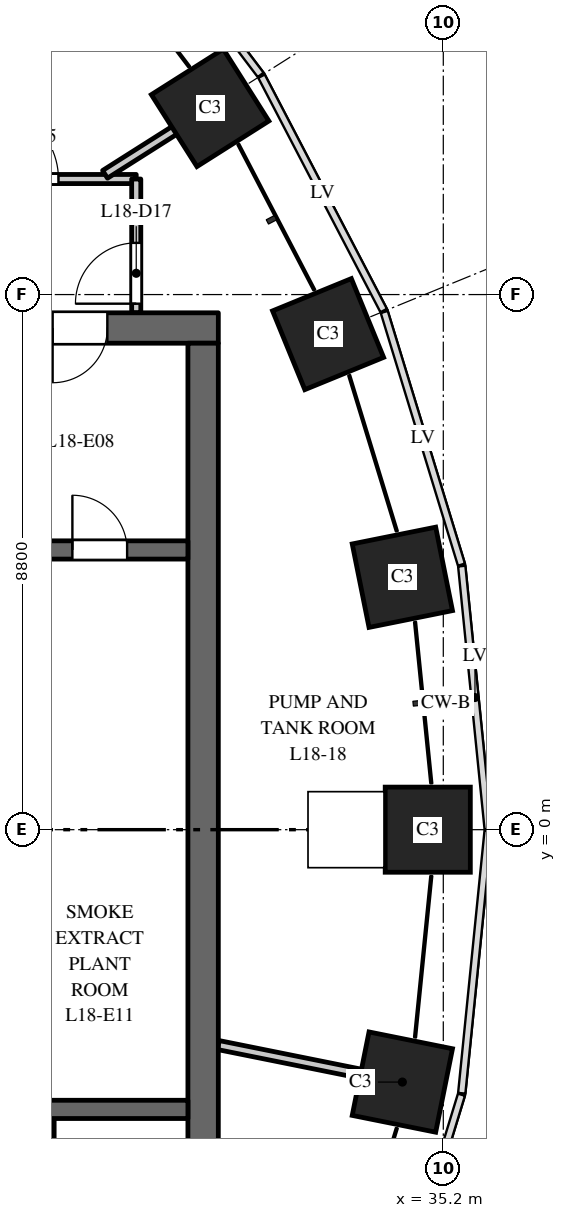
"""IFC4 building model, lengths in metres.
Left out: names, types, materials, properties, quantities, classifications, styles, units other than length and angle.
Written with IfcOpenShell. Run it as: python <this file> out.ifc"""

import sys

from ifc_helpers import new_model, si_unit, direction, frame, frame_2d, origin, origin_2d, place, context, subcontext, project, spatial, rectangle, extrude, element, fill, save


model = new_model("IFC4")
c1 = context("Model", 3, precision=1e-05, world=origin(), true_north=direction((0.0, 1.0)))
c2 = subcontext(c1, "Body", "Model", "MODEL_VIEW")
j1 = project(units=[si_unit("LENGTHUNIT", "METRE"), si_unit("PLANEANGLEUNIT", "RADIAN")], contexts=[c1])
p1 = place(None, origin())
s1 = spatial("IfcSite", under=j1, at=p1, CompositionType="ELEMENT")
p2 = place(p1, origin())
s2 = spatial("IfcBuilding", under=s1, at=p2, CompositionType="ELEMENT")
p3 = place(p2, frame((0.0, 0.0, 82.5)))
s3 = spatial("IfcBuildingStorey", under=s2, at=p3, CompositionType="ELEMENT", Elevation=82.5)
for number, where, z_axis, x_axis in (
    (1, (34.945, 0.0, 0.0), (0.0, 0.0, 1.0), (0.0, 1.0, 0.0)),
    (2, (34.527, 4.151, 0.0), (0.0, 0.0, 1.0), (-0.197, 0.98, 0.0)),
    (3, (33.305, 8.149, 0.0), (0.0, 0.0, 1.0), (-0.379, 0.925, 0.0)),
    (4, (31.365, 11.871, 0.0), (0.0, 0.0, 1.0), (-0.535, 0.845, 0.0)),
    (5, (34.527, -4.151, 0.0), (0.0, 0.0, 1.0), (0.197, 0.98, 0.0)),
):
    element("IfcColumn", number, at=place(p3, frame(where, z_axis=z_axis, x_axis=x_axis)), inside=s3, PredefinedType="COLUMN", context=c2, shape_type="SweptSolid", body=[
        extrude(rectangle(XDim=1.4, YDim=1.4, at=origin_2d()), origin(), (0.0, 0.0, 1.0), 5.5),
    ])
p4 = place(p3, frame((16.5, 8.25, 0.0), z_axis=(0.0, 0.0, 1.0), x_axis=(1.0, 0.0, 0.0)))
e6 = element("IfcWall", 6, at=p4, inside=s3, PredefinedType="SHEAR", context=c2, shape_type="SweptSolid", body=[
    extrude(rectangle(XDim=15.0, YDim=0.5, at=frame_2d((7.5, 0.0))), origin(), (0.0, 0.0, 1.0), 5.2),
])
p5 = place(p4, frame((6.9, 0.0, 0.0)))
e7 = element("IfcOpeningElement", 7, at=p5, cuts=e6, PredefinedType="OPENING", context=c2, shape_type="SweptSolid", body=[
    extrude(rectangle(XDim=1.2, YDim=2.1, at=frame_2d((0.6, 1.05))), frame((0.0, 0.26, 0.0), z_axis=(0.0, -1.0, 0.0), x_axis=(1.0, 0.0, 0.0)), (0.0, 0.0, 1.0), 0.52),
])
p6 = place(p4, frame((12.275, 0.0, 0.0)))
e8 = element("IfcOpeningElement", 8, at=p6, cuts=e6, PredefinedType="OPENING", context=c2, shape_type="SweptSolid", body=[
    extrude(rectangle(XDim=0.9, YDim=2.1, at=frame_2d((0.45, 1.05))), frame((0.0, 0.26, 0.0), z_axis=(0.0, -1.0, 0.0), x_axis=(1.0, 0.0, 0.0)), (0.0, 0.0, 1.0), 0.52),
])
p7 = place(p3, frame((31.25, -8.0, 0.0), z_axis=(0.0, 0.0, 1.0), x_axis=(0.0, 1.0, 0.0)))
e9 = element("IfcWall", 9, at=p7, inside=s3, PredefinedType="SHEAR", context=c2, shape_type="SweptSolid", body=[
    extrude(rectangle(XDim=16.0, YDim=0.5, at=frame_2d((8.0, 0.0))), origin(), (0.0, 0.0, 1.0), 5.2),
])
p8 = place(p3, frame((24.9, 4.6, 0.0), z_axis=(0.0, 0.0, 1.0), x_axis=(1.0, 0.0, 0.0)))
e10 = element("IfcWall", 10, at=p8, inside=s3, PredefinedType="SHEAR", context=c2, shape_type="SweptSolid", body=[
    extrude(rectangle(XDim=6.1, YDim=0.3, at=frame_2d((3.05, 0.0))), origin(), (0.0, 0.0, 1.0), 5.2),
])
p9 = place(p8, frame((4.2, 0.0, 0.0)))
e11 = element("IfcOpeningElement", 11, at=p9, cuts=e10, PredefinedType="OPENING", context=c2, shape_type="SweptSolid", body=[
    extrude(rectangle(XDim=0.9, YDim=2.1, at=frame_2d((0.45, 1.05))), frame((0.0, 0.16, 0.0), z_axis=(0.0, -1.0, 0.0), x_axis=(1.0, 0.0, 0.0)), (0.0, 0.0, 1.0), 0.32),
])
p10 = place(p3, frame((28.7, -8.0, 0.0), z_axis=(0.0, 0.0, 1.0), x_axis=(0.0, 1.0, 0.0)))
e12 = element("IfcWall", 12, at=p10, inside=s3, PredefinedType="PARTITIONING", context=c2, shape_type="SweptSolid", body=[
    extrude(rectangle(XDim=3.25, YDim=0.2, at=frame_2d((1.625, 0.0))), origin(), (0.0, 0.0, 1.0), 5.2),
])
p11 = place(p3, frame((24.9, -4.6, 0.0), z_axis=(0.0, 0.0, 1.0), x_axis=(1.0, 0.0, 0.0)))
e13 = element("IfcWall", 13, at=p11, inside=s3, PredefinedType="SHEAR", context=c2, shape_type="SweptSolid", body=[
    extrude(rectangle(XDim=6.1, YDim=0.3, at=frame_2d((3.05, 0.0))), origin(), (0.0, 0.0, 1.0), 5.2),
])
p12 = place(p3, frame((16.5, 10.7, 0.0), z_axis=(0.0, 0.0, 1.0), x_axis=(1.0, 0.0, 0.0)))
e14 = element("IfcWall", 14, at=p12, inside=s3, PredefinedType="PARTITIONING", context=c2, shape_type="SweptSolid", body=[
    extrude(rectangle(XDim=13.65, YDim=0.15, at=frame_2d((6.825, 0.0))), origin(), (0.0, 0.0, 1.0), 4.25),
])
p13 = place(p12, frame((11.171, 0.0, 0.0)))
e15 = element("IfcOpeningElement", 15, at=p13, cuts=e14, PredefinedType="OPENING", context=c2, shape_type="SweptSolid", body=[
    extrude(rectangle(XDim=1.2, YDim=2.1, at=frame_2d((0.6, 1.05))), frame((0.0, 0.085, 0.0), z_axis=(0.0, -1.0, 0.0), x_axis=(1.0, 0.0, 0.0)), (0.0, 0.0, 1.0), 0.17),
])
p14 = place(p3, frame((29.637, 10.777, 0.0), z_axis=(0.0, 0.0, 1.0), x_axis=(0.844747041197, 0.535165802709, 0.0)))
e16 = element("IfcWall", 16, at=p14, inside=s3, PredefinedType="PARTITIONING", context=c2, shape_type="SweptSolid", body=[
    extrude(rectangle(XDim=2.145, YDim=0.15, at=frame_2d((1.073, 0.0))), origin(), (0.0, 0.0, 1.0), 5.2),
])
p15 = place(p3, frame((31.5, -3.542, 0.0), z_axis=(0.0, 0.0, 1.0), x_axis=(0.98034430806, -0.197294291997, 0.0)))
e17 = element("IfcWall", 17, at=p15, inside=s3, PredefinedType="PARTITIONING", context=c2, shape_type="SweptSolid", body=[
    extrude(rectangle(XDim=3.188, YDim=0.15, at=frame_2d((1.594, 0.0))), origin(), (0.0, 0.0, 1.0), 5.2),
])
p16 = place(p3, frame((30.15, 8.5, 0.0), z_axis=(0.0, 0.0, 1.0), x_axis=(0.0, 1.0, 0.0)))
e18 = element("IfcWall", 18, at=p16, inside=s3, PredefinedType="PARTITIONING", context=c2, shape_type="SweptSolid", body=[
    extrude(rectangle(XDim=2.2, YDim=0.15, at=frame_2d((1.1, 0.0))), origin(), (0.0, 0.0, 1.0), 5.2),
])
p17 = place(p16, frame((0.15, 0.0, 0.0)))
e19 = element("IfcOpeningElement", 19, at=p17, cuts=e18, PredefinedType="OPENING", context=c2, shape_type="SweptSolid", body=[
    extrude(rectangle(XDim=1.0, YDim=2.1, at=frame_2d((0.5, 1.05))), frame((0.0, 0.085, 0.0), z_axis=(0.0, -1.0, 0.0), x_axis=(1.0, 0.0, 0.0)), (0.0, 0.0, 1.0), 0.17),
])
p18 = place(p6, origin())
e20 = element("IfcDoor", 20, at=p18, inside=s3, OperationType="SINGLE_SWING_LEFT", PredefinedType="DOOR", context=c2, shape_type="SweptSolid", body=[
    extrude(rectangle(XDim=0.9, YDim=2.1, at=frame_2d((0.45, 1.05))), frame((0.0, 0.025, 0.0), z_axis=(0.0, -1.0, 0.0), x_axis=(1.0, 0.0, 0.0)), (0.0, 0.0, 1.0), 0.05),
])
fill(e8, e20)
p19 = place(p9, origin())
e21 = element("IfcDoor", 21, at=p19, inside=s3, OperationType="SINGLE_SWING_RIGHT", PredefinedType="DOOR", context=c2, shape_type="SweptSolid", body=[
    extrude(rectangle(XDim=0.9, YDim=2.1, at=frame_2d((0.45, 1.05))), frame((0.0, 0.025, 0.0), z_axis=(0.0, -1.0, 0.0), x_axis=(1.0, 0.0, 0.0)), (0.0, 0.0, 1.0), 0.05),
])
fill(e11, e21)
p20 = place(p13, origin())
e22 = element("IfcDoor", 22, at=p20, inside=s3, OperationType="SINGLE_SWING_LEFT", PredefinedType="DOOR", context=c2, shape_type="SweptSolid", body=[
    extrude(rectangle(XDim=1.2, YDim=2.1, at=frame_2d((0.6, 1.05))), frame((0.0, 0.025, 0.0), z_axis=(0.0, -1.0, 0.0), x_axis=(1.0, 0.0, 0.0)), (0.0, 0.0, 1.0), 0.05),
])
fill(e15, e22)
p21 = place(p17, origin())
e23 = element("IfcDoor", 23, at=p21, inside=s3, OperationType="SINGLE_SWING_LEFT", PredefinedType="DOOR", context=c2, shape_type="SweptSolid", body=[
    extrude(rectangle(XDim=1.0, YDim=2.1, at=frame_2d((0.5, 1.05))), frame((0.0, 0.025, 0.0), z_axis=(0.0, -1.0, 0.0), x_axis=(1.0, 0.0, 0.0)), (0.0, 0.0, 1.0), 0.05),
])
fill(e19, e23)
save(model, sys.argv[1])
